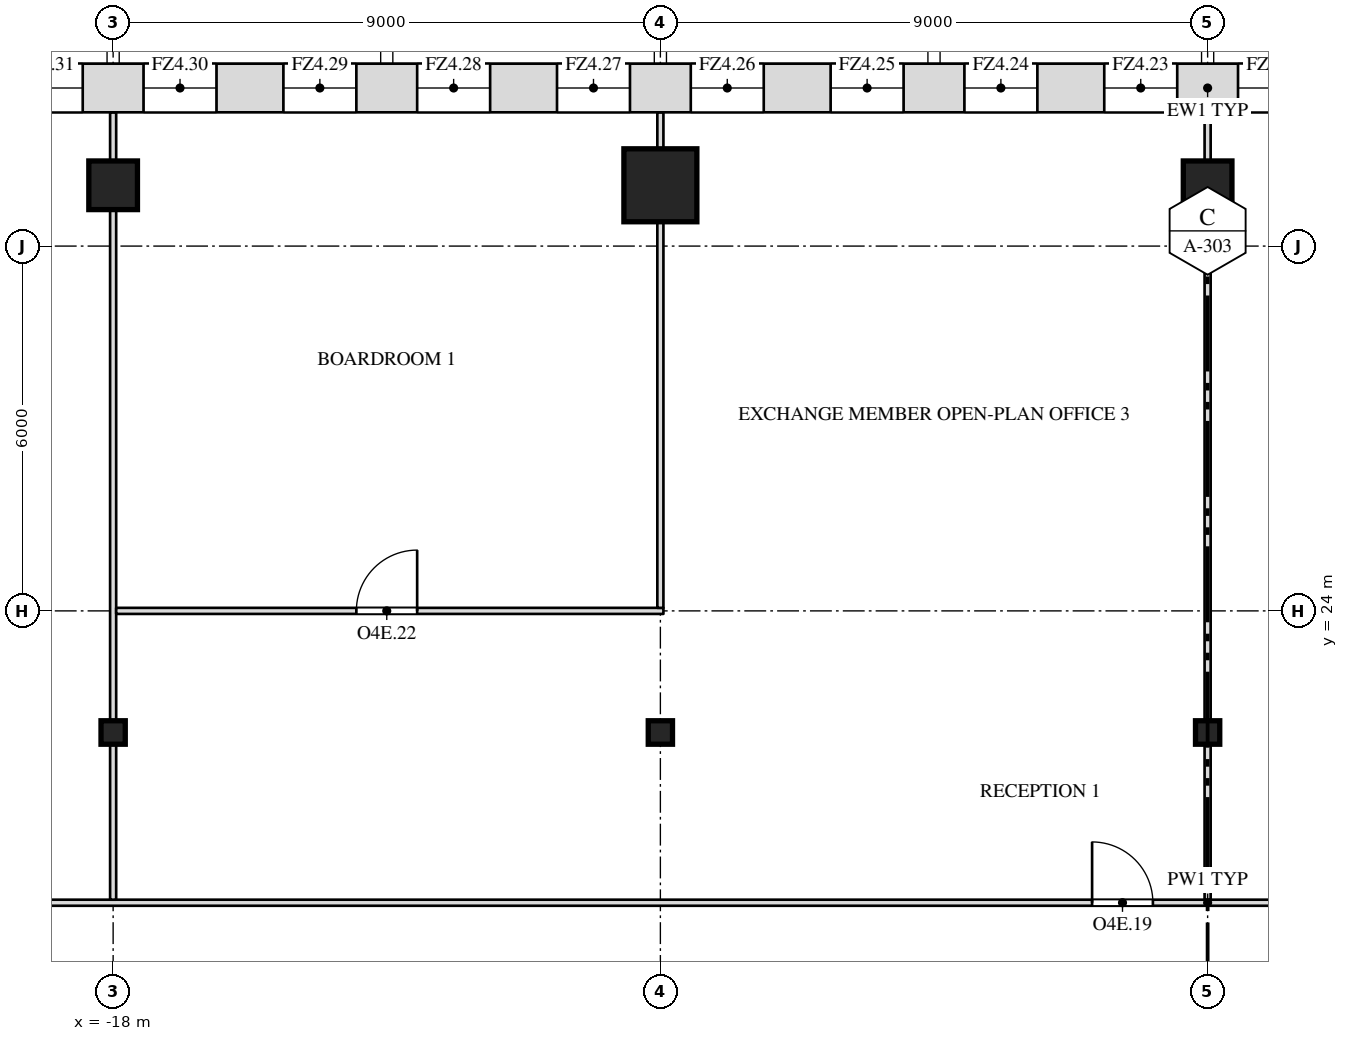
"""IFC4 building model, lengths in metres.
Left out: names, types, materials, properties, quantities, classifications, styles, units other than length and angle.
Written with IfcOpenShell. Run it as: python <this file> out.ifc"""

import sys

from ifc_helpers import new_model, si_unit, direction, frame, frame_2d, origin, origin_2d, place, context, subcontext, project, spatial, rectangle, i_section, extrude, element, fill, save


model = new_model("IFC4")
c1 = context("Model", 3, precision=1e-05, world=origin(), true_north=direction((0.0, 1.0)))
c2 = subcontext(c1, "Body", "Model", "MODEL_VIEW")
j1 = project(units=[si_unit("LENGTHUNIT", "METRE"), si_unit("PLANEANGLEUNIT", "RADIAN")], contexts=[c1])
p1 = place(None, origin())
s1 = spatial("IfcSite", under=j1, at=p1, CompositionType="ELEMENT")
p2 = place(p1, origin())
s2 = spatial("IfcBuilding", under=s1, at=p2, CompositionType="ELEMENT")
p3 = place(p2, frame((0.0, 0.0, 256.5)))
s3 = spatial("IfcBuildingStorey", under=s2, at=p3, CompositionType="ELEMENT", Elevation=256.5)
for number, where, z_axis, x_axis in (
    (1, (-18.0, 22.0, 0.0), (0.0, 0.0, 1.0), (1.0, 0.0, 0.0)),
    (2, (-9.0, 22.0, 0.0), (0.0, 0.0, 1.0), (1.0, 0.0, 0.0)),
    (3, (0.0, 22.0, 0.0), (0.0, 0.0, 1.0), (1.0, 0.0, 0.0)),
):
    element("IfcColumn", number, at=place(p3, frame(where, z_axis=z_axis, x_axis=x_axis)), inside=s3, PredefinedType="COLUMN", context=c2, shape_type="SweptSolid", body=[
        extrude(i_section(OverallWidth=0.399, OverallDepth=0.386, WebThickness=0.021, FlangeThickness=0.033, at=origin_2d()), origin(), (0.0, 0.0, 1.0), 4.0),
    ])
p4 = place(p3, frame((-18.0, 31.0, 0.0), z_axis=(0.0, 0.0, 1.0), x_axis=(1.0, 0.0, 0.0)))
e4 = element("IfcColumn", 4, at=p4, inside=s3, PredefinedType="COLUMN", context=c2, shape_type="SweptSolid", body=[
    extrude(rectangle(XDim=0.8, YDim=0.8, at=origin_2d()), origin(), (0.0, 0.0, 1.0), 4.0),
])
p5 = place(p3, frame((-9.0, 31.0, 0.0), z_axis=(0.0, 0.0, 1.0), x_axis=(1.0, 0.0, 0.0)))
e5 = element("IfcColumn", 5, at=p5, inside=s3, PredefinedType="COLUMN", context=c2, shape_type="SweptSolid", body=[
    extrude(rectangle(XDim=1.2, YDim=1.2, at=origin_2d()), origin(), (0.0, 0.0, 1.0), 4.0),
])
p6 = place(p3, frame((0.0, 31.0, 0.0), z_axis=(0.0, 0.0, 1.0), x_axis=(1.0, 0.0, 0.0)))
e6 = element("IfcColumn", 6, at=p6, inside=s3, PredefinedType="COLUMN", context=c2, shape_type="SweptSolid", body=[
    extrude(rectangle(XDim=0.8, YDim=0.8, at=origin_2d()), origin(), (0.0, 0.0, 1.0), 4.0),
])
p7 = place(p3, frame((-35.2, 19.2, 0.0), z_axis=(0.0, 0.0, 1.0), x_axis=(1.0, 0.0, 0.0)))
e7 = element("IfcWall", 7, at=p7, inside=s3, PredefinedType="PARTITIONING", context=c2, shape_type="SweptSolid", body=[
    extrude(rectangle(XDim=70.4, YDim=0.1, at=frame_2d((35.2, 0.0))), origin(), (0.0, 0.0, 1.0), 3.8),
])
p8 = place(p7, frame((10.5, 0.0, 0.0)))
e8 = element("IfcOpeningElement", 8, at=p8, cuts=e7, PredefinedType="OPENING", context=c2, shape_type="SweptSolid", body=[
    extrude(rectangle(XDim=1.8, YDim=2.1, at=frame_2d((0.9, 1.05))), frame((0.0, 0.062, 0.0), z_axis=(0.0, -1.0, 0.0), x_axis=(1.0, 0.0, 0.0)), (0.0, 0.0, 1.0), 0.124),
])
p9 = place(p7, frame((33.3, 0.0, 0.0)))
e9 = element("IfcOpeningElement", 9, at=p9, cuts=e7, PredefinedType="OPENING", context=c2, shape_type="SweptSolid", body=[
    extrude(rectangle(XDim=1.0, YDim=2.1, at=frame_2d((0.5, 1.05))), frame((0.0, 0.062, 0.0), z_axis=(0.0, -1.0, 0.0), x_axis=(1.0, 0.0, 0.0)), (0.0, 0.0, 1.0), 0.124),
])
p10 = place(p7, frame((39.7, 0.0, 0.0)))
e10 = element("IfcOpeningElement", 10, at=p10, cuts=e7, PredefinedType="OPENING", context=c2, shape_type="SweptSolid", body=[
    extrude(rectangle(XDim=1.8, YDim=2.1, at=frame_2d((0.9, 1.05))), frame((0.0, 0.062, 0.0), z_axis=(0.0, -1.0, 0.0), x_axis=(1.0, 0.0, 0.0)), (0.0, 0.0, 1.0), 0.124),
])
p11 = place(p7, frame((60.3, 0.0, 0.0)))
e11 = element("IfcOpeningElement", 11, at=p11, cuts=e7, PredefinedType="OPENING", context=c2, shape_type="SweptSolid", body=[
    extrude(rectangle(XDim=1.0, YDim=2.1, at=frame_2d((0.5, 1.05))), frame((0.0, 0.062, 0.0), z_axis=(0.0, -1.0, 0.0), x_axis=(1.0, 0.0, 0.0)), (0.0, 0.0, 1.0), 0.124),
])
p12 = place(p3, frame((-18.0, 19.25, 0.0), z_axis=(0.0, 0.0, 1.0), x_axis=(0.0, 1.0, 0.0)))
e12 = element("IfcWall", 12, at=p12, inside=s3, PredefinedType="PARTITIONING", context=c2, shape_type="SweptSolid", body=[
    extrude(rectangle(XDim=2.557, YDim=0.1, at=frame_2d((1.278, 0.0))), origin(), (0.0, 0.0, 1.0), 3.193),
])
p13 = place(p3, frame((-18.0, 22.193, 0.0), z_axis=(0.0, 0.0, 1.0), x_axis=(0.0, 1.0, 0.0)))
e13 = element("IfcWall", 13, at=p13, inside=s3, PredefinedType="PARTITIONING", context=c2, shape_type="SweptSolid", body=[
    extrude(rectangle(XDim=8.407, YDim=0.1, at=frame_2d((4.204, 0.0))), origin(), (0.0, 0.0, 1.0), 3.193),
])
p14 = place(p3, frame((-18.0, 31.4, 0.0), z_axis=(0.0, 0.0, 1.0), x_axis=(0.0, 1.0, 0.0)))
e14 = element("IfcWall", 14, at=p14, inside=s3, PredefinedType="PARTITIONING", context=c2, shape_type="SweptSolid", body=[
    extrude(rectangle(XDim=0.8, YDim=0.1, at=frame_2d((0.4, 0.0))), origin(), (0.0, 0.0, 1.0), 3.8),
])
p15 = place(p3, frame((0.0, 19.25, 0.0), z_axis=(0.0, 0.0, 1.0), x_axis=(0.0, 1.0, 0.0)))
e15 = element("IfcWall", 15, at=p15, inside=s3, PredefinedType="PARTITIONING", context=c2, shape_type="SweptSolid", body=[
    extrude(rectangle(XDim=2.557, YDim=0.1, at=frame_2d((1.278, 0.0))), origin(), (0.0, 0.0, 1.0), 3.193),
])
p16 = place(p3, frame((0.0, 22.193, 0.0), z_axis=(0.0, 0.0, 1.0), x_axis=(0.0, 1.0, 0.0)))
e16 = element("IfcWall", 16, at=p16, inside=s3, PredefinedType="PARTITIONING", context=c2, shape_type="SweptSolid", body=[
    extrude(rectangle(XDim=8.407, YDim=0.1, at=frame_2d((4.204, 0.0))), origin(), (0.0, 0.0, 1.0), 3.193),
])
p17 = place(p3, frame((0.0, 31.4, 0.0), z_axis=(0.0, 0.0, 1.0), x_axis=(0.0, 1.0, 0.0)))
e17 = element("IfcWall", 17, at=p17, inside=s3, PredefinedType="PARTITIONING", context=c2, shape_type="SweptSolid", body=[
    extrude(rectangle(XDim=0.8, YDim=0.1, at=frame_2d((0.4, 0.0))), origin(), (0.0, 0.0, 1.0), 3.8),
])
p18 = place(p3, frame((-17.95, 24.0, 0.0), z_axis=(0.0, 0.0, 1.0), x_axis=(1.0, 0.0, 0.0)))
e18 = element("IfcWall", 18, at=p18, inside=s3, PredefinedType="PARTITIONING", context=c2, shape_type="SweptSolid", body=[
    extrude(rectangle(XDim=9.0, YDim=0.1, at=frame_2d((4.5, 0.0))), origin(), (0.0, 0.0, 1.0), 3.8),
])
p19 = place(p18, frame((3.95, 0.0, 0.0)))
e19 = element("IfcOpeningElement", 19, at=p19, cuts=e18, PredefinedType="OPENING", context=c2, shape_type="SweptSolid", body=[
    extrude(rectangle(XDim=1.0, YDim=2.1, at=frame_2d((0.5, 1.05))), frame((0.0, 0.062, 0.0), z_axis=(0.0, -1.0, 0.0), x_axis=(1.0, 0.0, 0.0)), (0.0, 0.0, 1.0), 0.124),
])
p20 = place(p3, frame((-9.0, 24.05, 0.0), z_axis=(0.0, 0.0, 1.0), x_axis=(0.0, 1.0, 0.0)))
e20 = element("IfcWall", 20, at=p20, inside=s3, PredefinedType="PARTITIONING", context=c2, shape_type="SweptSolid", body=[
    extrude(rectangle(XDim=6.35, YDim=0.1, at=frame_2d((3.175, 0.0))), origin(), (0.0, 0.0, 1.0), 3.193),
])
p21 = place(p3, frame((-9.0, 31.6, 0.0), z_axis=(0.0, 0.0, 1.0), x_axis=(0.0, 1.0, 0.0)))
e21 = element("IfcWall", 21, at=p21, inside=s3, PredefinedType="PARTITIONING", context=c2, shape_type="SweptSolid", body=[
    extrude(rectangle(XDim=0.6, YDim=0.1, at=frame_2d((0.3, 0.0))), origin(), (0.0, 0.0, 1.0), 3.8),
])
p22 = place(p3, frame((29.948, 32.6, 0.0), z_axis=(0.0, 0.0, 1.0), x_axis=(-1.0, 0.0, 0.0)))
e22 = element("IfcWall", 22, at=p22, inside=s3, PredefinedType="SOLIDWALL", context=c2, shape_type="SweptSolid", body=[
    extrude(rectangle(XDim=59.895, YDim=0.8, at=frame_2d((29.948, 0.0))), origin(), (0.0, 0.0, 1.0), 3.8),
])
p23 = place(p22, frame((3.448, 0.0, 0.8)))
e23 = element("IfcOpeningElement", 23, at=p23, cuts=e22, PredefinedType="OPENING", context=c2, shape_type="SweptSolid", body=[
    extrude(rectangle(XDim=1.2, YDim=2.7, at=frame_2d((0.6, 1.35))), frame((0.0, 0.412, 0.0), z_axis=(0.0, -1.0, 0.0), x_axis=(1.0, 0.0, 0.0)), (0.0, 0.0, 1.0), 0.824),
])
p24 = place(p22, frame((5.748, 0.0, 0.8)))
e24 = element("IfcOpeningElement", 24, at=p24, cuts=e22, PredefinedType="OPENING", context=c2, shape_type="SweptSolid", body=[
    extrude(rectangle(XDim=1.2, YDim=2.7, at=frame_2d((0.6, 1.35))), frame((0.0, 0.412, 0.0), z_axis=(0.0, -1.0, 0.0), x_axis=(1.0, 0.0, 0.0)), (0.0, 0.0, 1.0), 0.824),
])
p25 = place(p22, frame((7.948, 0.0, 0.8)))
e25 = element("IfcOpeningElement", 25, at=p25, cuts=e22, PredefinedType="OPENING", context=c2, shape_type="SweptSolid", body=[
    extrude(rectangle(XDim=1.2, YDim=2.7, at=frame_2d((0.6, 1.35))), frame((0.0, 0.412, 0.0), z_axis=(0.0, -1.0, 0.0), x_axis=(1.0, 0.0, 0.0)), (0.0, 0.0, 1.0), 0.824),
])
p26 = place(p22, frame((10.248, 0.0, 0.8)))
e26 = element("IfcOpeningElement", 26, at=p26, cuts=e22, PredefinedType="OPENING", context=c2, shape_type="SweptSolid", body=[
    extrude(rectangle(XDim=1.2, YDim=2.7, at=frame_2d((0.6, 1.35))), frame((0.0, 0.412, 0.0), z_axis=(0.0, -1.0, 0.0), x_axis=(1.0, 0.0, 0.0)), (0.0, 0.0, 1.0), 0.824),
])
p27 = place(p22, frame((12.448, 0.0, 0.8)))
e27 = element("IfcOpeningElement", 27, at=p27, cuts=e22, PredefinedType="OPENING", context=c2, shape_type="SweptSolid", body=[
    extrude(rectangle(XDim=1.2, YDim=2.7, at=frame_2d((0.6, 1.35))), frame((0.0, 0.412, 0.0), z_axis=(0.0, -1.0, 0.0), x_axis=(1.0, 0.0, 0.0)), (0.0, 0.0, 1.0), 0.824),
])
p28 = place(p22, frame((14.748, 0.0, 0.8)))
e28 = element("IfcOpeningElement", 28, at=p28, cuts=e22, PredefinedType="OPENING", context=c2, shape_type="SweptSolid", body=[
    extrude(rectangle(XDim=1.2, YDim=2.7, at=frame_2d((0.6, 1.35))), frame((0.0, 0.412, 0.0), z_axis=(0.0, -1.0, 0.0), x_axis=(1.0, 0.0, 0.0)), (0.0, 0.0, 1.0), 0.824),
])
p29 = place(p22, frame((16.948, 0.0, 0.8)))
e29 = element("IfcOpeningElement", 29, at=p29, cuts=e22, PredefinedType="OPENING", context=c2, shape_type="SweptSolid", body=[
    extrude(rectangle(XDim=1.2, YDim=2.7, at=frame_2d((0.6, 1.35))), frame((0.0, 0.412, 0.0), z_axis=(0.0, -1.0, 0.0), x_axis=(1.0, 0.0, 0.0)), (0.0, 0.0, 1.0), 0.824),
])
p30 = place(p22, frame((19.248, 0.0, 0.8)))
e30 = element("IfcOpeningElement", 30, at=p30, cuts=e22, PredefinedType="OPENING", context=c2, shape_type="SweptSolid", body=[
    extrude(rectangle(XDim=1.2, YDim=2.7, at=frame_2d((0.6, 1.35))), frame((0.0, 0.412, 0.0), z_axis=(0.0, -1.0, 0.0), x_axis=(1.0, 0.0, 0.0)), (0.0, 0.0, 1.0), 0.824),
])
p31 = place(p22, frame((21.448, 0.0, 0.8)))
e31 = element("IfcOpeningElement", 31, at=p31, cuts=e22, PredefinedType="OPENING", context=c2, shape_type="SweptSolid", body=[
    extrude(rectangle(XDim=1.2, YDim=2.7, at=frame_2d((0.6, 1.35))), frame((0.0, 0.412, 0.0), z_axis=(0.0, -1.0, 0.0), x_axis=(1.0, 0.0, 0.0)), (0.0, 0.0, 1.0), 0.824),
])
p32 = place(p22, frame((23.748, 0.0, 0.8)))
e32 = element("IfcOpeningElement", 32, at=p32, cuts=e22, PredefinedType="OPENING", context=c2, shape_type="SweptSolid", body=[
    extrude(rectangle(XDim=1.2, YDim=2.7, at=frame_2d((0.6, 1.35))), frame((0.0, 0.412, 0.0), z_axis=(0.0, -1.0, 0.0), x_axis=(1.0, 0.0, 0.0)), (0.0, 0.0, 1.0), 0.824),
])
p33 = place(p22, frame((25.948, 0.0, 0.8)))
e33 = element("IfcOpeningElement", 33, at=p33, cuts=e22, PredefinedType="OPENING", context=c2, shape_type="SweptSolid", body=[
    extrude(rectangle(XDim=1.2, YDim=2.7, at=frame_2d((0.6, 1.35))), frame((0.0, 0.412, 0.0), z_axis=(0.0, -1.0, 0.0), x_axis=(1.0, 0.0, 0.0)), (0.0, 0.0, 1.0), 0.824),
])
p34 = place(p22, frame((28.248, 0.0, 0.8)))
e34 = element("IfcOpeningElement", 34, at=p34, cuts=e22, PredefinedType="OPENING", context=c2, shape_type="SweptSolid", body=[
    extrude(rectangle(XDim=1.2, YDim=2.7, at=frame_2d((0.6, 1.35))), frame((0.0, 0.412, 0.0), z_axis=(0.0, -1.0, 0.0), x_axis=(1.0, 0.0, 0.0)), (0.0, 0.0, 1.0), 0.824),
])
p35 = place(p22, frame((30.448, 0.0, 0.8)))
e35 = element("IfcOpeningElement", 35, at=p35, cuts=e22, PredefinedType="OPENING", context=c2, shape_type="SweptSolid", body=[
    extrude(rectangle(XDim=1.2, YDim=2.7, at=frame_2d((0.6, 1.35))), frame((0.0, 0.412, 0.0), z_axis=(0.0, -1.0, 0.0), x_axis=(1.0, 0.0, 0.0)), (0.0, 0.0, 1.0), 0.824),
])
p36 = place(p22, frame((32.748, 0.0, 0.8)))
e36 = element("IfcOpeningElement", 36, at=p36, cuts=e22, PredefinedType="OPENING", context=c2, shape_type="SweptSolid", body=[
    extrude(rectangle(XDim=1.2, YDim=2.7, at=frame_2d((0.6, 1.35))), frame((0.0, 0.412, 0.0), z_axis=(0.0, -1.0, 0.0), x_axis=(1.0, 0.0, 0.0)), (0.0, 0.0, 1.0), 0.824),
])
p37 = place(p22, frame((34.948, 0.0, 0.8)))
e37 = element("IfcOpeningElement", 37, at=p37, cuts=e22, PredefinedType="OPENING", context=c2, shape_type="SweptSolid", body=[
    extrude(rectangle(XDim=1.2, YDim=2.7, at=frame_2d((0.6, 1.35))), frame((0.0, 0.412, 0.0), z_axis=(0.0, -1.0, 0.0), x_axis=(1.0, 0.0, 0.0)), (0.0, 0.0, 1.0), 0.824),
])
p38 = place(p22, frame((37.248, 0.0, 0.8)))
e38 = element("IfcOpeningElement", 38, at=p38, cuts=e22, PredefinedType="OPENING", context=c2, shape_type="SweptSolid", body=[
    extrude(rectangle(XDim=1.2, YDim=2.7, at=frame_2d((0.6, 1.35))), frame((0.0, 0.412, 0.0), z_axis=(0.0, -1.0, 0.0), x_axis=(1.0, 0.0, 0.0)), (0.0, 0.0, 1.0), 0.824),
])
p39 = place(p22, frame((39.448, 0.0, 0.8)))
e39 = element("IfcOpeningElement", 39, at=p39, cuts=e22, PredefinedType="OPENING", context=c2, shape_type="SweptSolid", body=[
    extrude(rectangle(XDim=1.2, YDim=2.7, at=frame_2d((0.6, 1.35))), frame((0.0, 0.412, 0.0), z_axis=(0.0, -1.0, 0.0), x_axis=(1.0, 0.0, 0.0)), (0.0, 0.0, 1.0), 0.824),
])
p40 = place(p22, frame((41.748, 0.0, 0.8)))
e40 = element("IfcOpeningElement", 40, at=p40, cuts=e22, PredefinedType="OPENING", context=c2, shape_type="SweptSolid", body=[
    extrude(rectangle(XDim=1.2, YDim=2.7, at=frame_2d((0.6, 1.35))), frame((0.0, 0.412, 0.0), z_axis=(0.0, -1.0, 0.0), x_axis=(1.0, 0.0, 0.0)), (0.0, 0.0, 1.0), 0.824),
])
p41 = place(p22, frame((43.948, 0.0, 0.8)))
e41 = element("IfcOpeningElement", 41, at=p41, cuts=e22, PredefinedType="OPENING", context=c2, shape_type="SweptSolid", body=[
    extrude(rectangle(XDim=1.2, YDim=2.7, at=frame_2d((0.6, 1.35))), frame((0.0, 0.412, 0.0), z_axis=(0.0, -1.0, 0.0), x_axis=(1.0, 0.0, 0.0)), (0.0, 0.0, 1.0), 0.824),
])
p42 = place(p22, frame((46.248, 0.0, 0.8)))
e42 = element("IfcOpeningElement", 42, at=p42, cuts=e22, PredefinedType="OPENING", context=c2, shape_type="SweptSolid", body=[
    extrude(rectangle(XDim=1.2, YDim=2.7, at=frame_2d((0.6, 1.35))), frame((0.0, 0.412, 0.0), z_axis=(0.0, -1.0, 0.0), x_axis=(1.0, 0.0, 0.0)), (0.0, 0.0, 1.0), 0.824),
])
p43 = place(p22, frame((48.448, 0.0, 0.8)))
e43 = element("IfcOpeningElement", 43, at=p43, cuts=e22, PredefinedType="OPENING", context=c2, shape_type="SweptSolid", body=[
    extrude(rectangle(XDim=1.2, YDim=2.7, at=frame_2d((0.6, 1.35))), frame((0.0, 0.412, 0.0), z_axis=(0.0, -1.0, 0.0), x_axis=(1.0, 0.0, 0.0)), (0.0, 0.0, 1.0), 0.824),
])
p44 = place(p22, frame((50.748, 0.0, 0.8)))
e44 = element("IfcOpeningElement", 44, at=p44, cuts=e22, PredefinedType="OPENING", context=c2, shape_type="SweptSolid", body=[
    extrude(rectangle(XDim=1.2, YDim=2.7, at=frame_2d((0.6, 1.35))), frame((0.0, 0.412, 0.0), z_axis=(0.0, -1.0, 0.0), x_axis=(1.0, 0.0, 0.0)), (0.0, 0.0, 1.0), 0.824),
])
p45 = place(p22, frame((52.948, 0.0, 0.8)))
e45 = element("IfcOpeningElement", 45, at=p45, cuts=e22, PredefinedType="OPENING", context=c2, shape_type="SweptSolid", body=[
    extrude(rectangle(XDim=1.2, YDim=2.7, at=frame_2d((0.6, 1.35))), frame((0.0, 0.412, 0.0), z_axis=(0.0, -1.0, 0.0), x_axis=(1.0, 0.0, 0.0)), (0.0, 0.0, 1.0), 0.824),
])
p46 = place(p22, frame((55.248, 0.0, 0.8)))
e46 = element("IfcOpeningElement", 46, at=p46, cuts=e22, PredefinedType="OPENING", context=c2, shape_type="SweptSolid", body=[
    extrude(rectangle(XDim=1.2, YDim=2.7, at=frame_2d((0.6, 1.35))), frame((0.0, 0.412, 0.0), z_axis=(0.0, -1.0, 0.0), x_axis=(1.0, 0.0, 0.0)), (0.0, 0.0, 1.0), 0.824),
])
p47 = place(p9, origin())
e47 = element("IfcDoor", 47, at=p47, inside=s3, OperationType="SINGLE_SWING_LEFT", PredefinedType="DOOR", context=c2, shape_type="SweptSolid", body=[
    extrude(rectangle(XDim=1.0, YDim=2.1, at=frame_2d((0.5, 1.05))), frame((0.0, 0.025, 0.0), z_axis=(0.0, -1.0, 0.0), x_axis=(1.0, 0.0, 0.0)), (0.0, 0.0, 1.0), 0.05),
])
fill(e9, e47)
p48 = place(p19, origin())
e48 = element("IfcDoor", 48, at=p48, inside=s3, OperationType="SINGLE_SWING_RIGHT", PredefinedType="DOOR", context=c2, shape_type="SweptSolid", body=[
    extrude(rectangle(XDim=1.0, YDim=2.1, at=frame_2d((0.5, 1.05))), frame((0.0, 0.025, 0.0), z_axis=(0.0, -1.0, 0.0), x_axis=(1.0, 0.0, 0.0)), (0.0, 0.0, 1.0), 0.05),
])
fill(e19, e48)
p49 = place(p34, origin())
e49 = element("IfcWindow", 49, at=p49, inside=s3, PartitioningType="SINGLE_PANEL", PredefinedType="WINDOW", context=c2, shape_type="SweptSolid", body=[
    extrude(rectangle(XDim=1.2, YDim=2.7, at=frame_2d((0.6, 1.35))), frame((0.0, 0.03, 0.0), z_axis=(0.0, -1.0, 0.0), x_axis=(1.0, 0.0, 0.0)), (0.0, 0.0, 1.0), 0.06),
])
fill(e34, e49)
p50 = place(p35, origin())
e50 = element("IfcWindow", 50, at=p50, inside=s3, PartitioningType="SINGLE_PANEL", PredefinedType="WINDOW", context=c2, shape_type="SweptSolid", body=[
    extrude(rectangle(XDim=1.2, YDim=2.7, at=frame_2d((0.6, 1.35))), frame((0.0, 0.03, 0.0), z_axis=(0.0, -1.0, 0.0), x_axis=(1.0, 0.0, 0.0)), (0.0, 0.0, 1.0), 0.06),
])
fill(e35, e50)
p51 = place(p36, origin())
e51 = element("IfcWindow", 51, at=p51, inside=s3, PartitioningType="SINGLE_PANEL", PredefinedType="WINDOW", context=c2, shape_type="SweptSolid", body=[
    extrude(rectangle(XDim=1.2, YDim=2.7, at=frame_2d((0.6, 1.35))), frame((0.0, 0.03, 0.0), z_axis=(0.0, -1.0, 0.0), x_axis=(1.0, 0.0, 0.0)), (0.0, 0.0, 1.0), 0.06),
])
fill(e36, e51)
p52 = place(p37, origin())
e52 = element("IfcWindow", 52, at=p52, inside=s3, PartitioningType="SINGLE_PANEL", PredefinedType="WINDOW", context=c2, shape_type="SweptSolid", body=[
    extrude(rectangle(XDim=1.2, YDim=2.7, at=frame_2d((0.6, 1.35))), frame((0.0, 0.03, 0.0), z_axis=(0.0, -1.0, 0.0), x_axis=(1.0, 0.0, 0.0)), (0.0, 0.0, 1.0), 0.06),
])
fill(e37, e52)
p53 = place(p38, origin())
e53 = element("IfcWindow", 53, at=p53, inside=s3, PartitioningType="SINGLE_PANEL", PredefinedType="WINDOW", context=c2, shape_type="SweptSolid", body=[
    extrude(rectangle(XDim=1.2, YDim=2.7, at=frame_2d((0.6, 1.35))), frame((0.0, 0.03, 0.0), z_axis=(0.0, -1.0, 0.0), x_axis=(1.0, 0.0, 0.0)), (0.0, 0.0, 1.0), 0.06),
])
fill(e38, e53)
p54 = place(p39, origin())
e54 = element("IfcWindow", 54, at=p54, inside=s3, PartitioningType="SINGLE_PANEL", PredefinedType="WINDOW", context=c2, shape_type="SweptSolid", body=[
    extrude(rectangle(XDim=1.2, YDim=2.7, at=frame_2d((0.6, 1.35))), frame((0.0, 0.03, 0.0), z_axis=(0.0, -1.0, 0.0), x_axis=(1.0, 0.0, 0.0)), (0.0, 0.0, 1.0), 0.06),
])
fill(e39, e54)
p55 = place(p40, origin())
e55 = element("IfcWindow", 55, at=p55, inside=s3, PartitioningType="SINGLE_PANEL", PredefinedType="WINDOW", context=c2, shape_type="SweptSolid", body=[
    extrude(rectangle(XDim=1.2, YDim=2.7, at=frame_2d((0.6, 1.35))), frame((0.0, 0.03, 0.0), z_axis=(0.0, -1.0, 0.0), x_axis=(1.0, 0.0, 0.0)), (0.0, 0.0, 1.0), 0.06),
])
fill(e40, e55)
p56 = place(p41, origin())
e56 = element("IfcWindow", 56, at=p56, inside=s3, PartitioningType="SINGLE_PANEL", PredefinedType="WINDOW", context=c2, shape_type="SweptSolid", body=[
    extrude(rectangle(XDim=1.2, YDim=2.7, at=frame_2d((0.6, 1.35))), frame((0.0, 0.03, 0.0), z_axis=(0.0, -1.0, 0.0), x_axis=(1.0, 0.0, 0.0)), (0.0, 0.0, 1.0), 0.06),
])
fill(e41, e56)
p57 = place(p42, origin())
e57 = element("IfcWindow", 57, at=p57, inside=s3, PartitioningType="SINGLE_PANEL", PredefinedType="WINDOW", context=c2, shape_type="SweptSolid", body=[
    extrude(rectangle(XDim=1.2, YDim=2.7, at=frame_2d((0.6, 1.35))), frame((0.0, 0.03, 0.0), z_axis=(0.0, -1.0, 0.0), x_axis=(1.0, 0.0, 0.0)), (0.0, 0.0, 1.0), 0.06),
])
fill(e42, e57)
p58 = place(p43, origin())
e58 = element("IfcWindow", 58, at=p58, inside=s3, PartitioningType="SINGLE_PANEL", PredefinedType="WINDOW", context=c2, shape_type="SweptSolid", body=[
    extrude(rectangle(XDim=1.2, YDim=2.7, at=frame_2d((0.6, 1.35))), frame((0.0, 0.03, 0.0), z_axis=(0.0, -1.0, 0.0), x_axis=(1.0, 0.0, 0.0)), (0.0, 0.0, 1.0), 0.06),
])
fill(e43, e58)
save(model, sys.argv[1])
